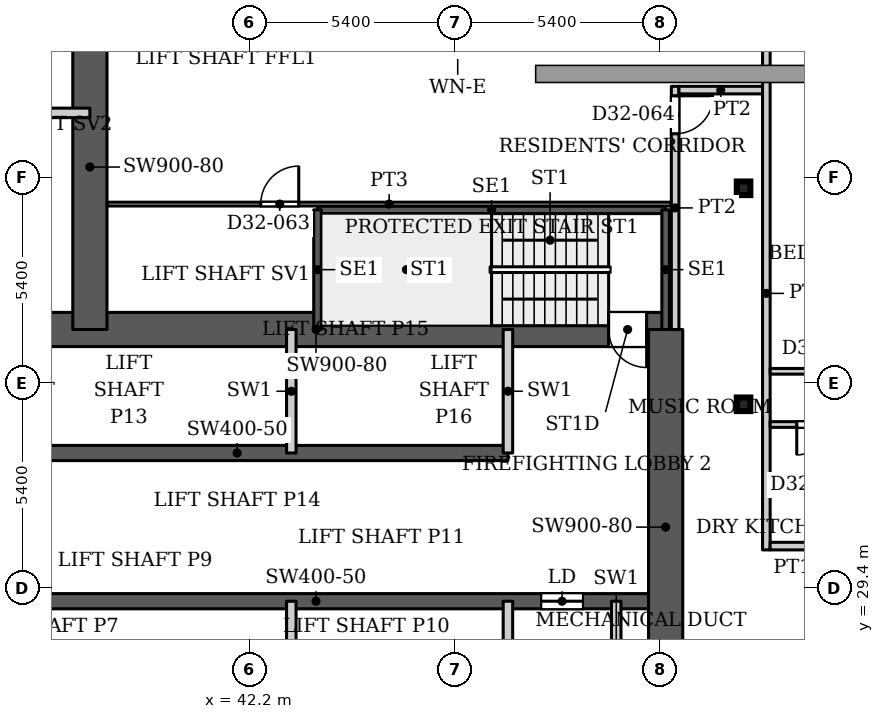
"""IFC4 building model, lengths in metres.
Left out: names, types, materials, properties, quantities, classifications, styles, units other than length and angle.
Written with IfcOpenShell. Run it as: python <this file> out.ifc"""

import sys

from ifc_helpers import new_model, si_unit, direction, frame, frame_2d, origin, origin_2d, place, context, subcontext, project, spatial, rectangle, hollow_rectangle, extrude, source, transform, mapped, element, fill, save


model = new_model("IFC4")
c1 = context("Model", 3, precision=1e-05, world=origin(), true_north=direction((0.0, 1.0)))
c2 = subcontext(c1, "Body", "Model", "MODEL_VIEW")
j1 = project(units=[si_unit("LENGTHUNIT", "METRE"), si_unit("PLANEANGLEUNIT", "RADIAN")], contexts=[c1])
p1 = place(None, origin())
s1 = spatial("IfcSite", under=j1, at=p1, CompositionType="ELEMENT")
p2 = place(p1, origin())
s2 = spatial("IfcBuilding", under=s1, at=p2, CompositionType="ELEMENT")
p3 = place(p2, frame((0.0, 0.0, 137.0)))
s3 = spatial("IfcBuildingStorey", under=s2, at=p3, CompositionType="ELEMENT", Elevation=137.0)
for number, where, z_axis, x_axis in (
    (1, (55.2, 34.232, 0.0), (0.0, 0.0, 1.0), (1.0, 0.0, 0.0)),
    (2, (55.2, 39.916, 0.0), (0.0, 0.0, 1.0), (1.0, 0.0, 0.0)),
):
    element("IfcColumn", number, at=place(p3, frame(where, z_axis=z_axis, x_axis=x_axis)), inside=s3, PredefinedType="COLUMN", context=c2, shape_type="SweptSolid", body=[
        extrude(hollow_rectangle(XDim=0.356, YDim=0.356, WallThickness=0.016, InnerFilletRadius=0.016, OuterFilletRadius=0.032, at=origin_2d()), origin(), (0.0, 0.0, 1.0), 3.9),
    ])
p4 = place(p3, frame((34.75, 29.05, 0.0), z_axis=(0.0, 0.0, 1.0), x_axis=(1.0, 0.0, 0.0)))
e3 = element("IfcWall", 3, at=p4, inside=s3, PredefinedType="SHEAR", context=c2, shape_type="SweptSolid", body=[
    extrude(rectangle(XDim=18.4, YDim=0.4, at=frame_2d((9.2, 0.0))), origin(), (0.0, 0.0, 1.0), 3.9),
])
p5 = place(p4, frame((15.125, 0.0, 0.0)))
e4 = element("IfcOpeningElement", 4, at=p5, cuts=e3, PredefinedType="OPENING", context=c2, shape_type="SweptSolid", body=[
    extrude(rectangle(XDim=1.1, YDim=2.2, at=frame_2d((0.55, 1.1))), frame((0.0, 0.21, 0.0), z_axis=(0.0, -1.0, 0.0), x_axis=(1.0, 0.0, 0.0)), (0.0, 0.0, 1.0), 0.42),
])
p6 = place(p3, frame((34.75, 32.95, 0.0), z_axis=(0.0, 0.0, 1.0), x_axis=(1.0, 0.0, 0.0)))
e5 = element("IfcWall", 5, at=p6, inside=s3, PredefinedType="SHEAR", context=c2, shape_type="SweptSolid", body=[
    extrude(rectangle(XDim=14.25, YDim=0.4, at=frame_2d((7.125, 0.0))), origin(), (0.0, 0.0, 1.0), 3.9),
])
p7 = place(p3, frame((34.75, 36.2, 0.0), z_axis=(0.0, 0.0, 1.0), x_axis=(1.0, 0.0, 0.0)))
e6 = element("IfcWall", 6, at=p7, inside=s3, PredefinedType="SHEAR", context=c2, shape_type="SweptSolid", body=[
    extrude(rectangle(XDim=18.4, YDim=0.9, at=frame_2d((9.2, 0.0))), origin(), (0.0, 0.0, 1.0), 3.9),
])
p8 = place(p7, frame((16.9, 0.0, 0.0)))
e7 = element("IfcOpeningElement", 7, at=p8, cuts=e6, PredefinedType="OPENING", context=c2, shape_type="SweptSolid", body=[
    extrude(rectangle(XDim=1.0, YDim=2.2, at=frame_2d((0.5, 1.1))), frame((0.0, 0.46, 0.0), z_axis=(0.0, -1.0, 0.0), x_axis=(1.0, 0.0, 0.0)), (0.0, 0.0, 1.0), 0.92),
])
p9 = place(p3, frame((38.0, 36.2, 0.0), z_axis=(0.0, 0.0, 1.0), x_axis=(0.0, 1.0, 0.0)))
e8 = element("IfcWall", 8, at=p9, inside=s3, PredefinedType="SHEAR", context=c2, shape_type="SweptSolid", body=[
    extrude(rectangle(XDim=8.55, YDim=0.9, at=frame_2d((4.275, 0.0))), origin(), (0.0, 0.0, 1.0), 3.9),
])
p10 = place(p3, frame((53.15, 25.8, 0.0), z_axis=(0.0, 0.0, 1.0), x_axis=(0.0, 1.0, 0.0)))
e9 = element("IfcWall", 9, at=p10, inside=s3, PredefinedType="SHEAR", context=c2, shape_type="SweptSolid", body=[
    extrude(rectangle(XDim=10.4, YDim=0.9, at=frame_2d((5.2, 0.0))), origin(), (0.0, 0.0, 1.0), 3.9),
])
p11 = place(p3, frame((43.99, 39.35, 0.0), z_axis=(0.0, 0.0, 1.0), x_axis=(1.0, 0.0, 0.0)))
e10 = element("IfcWall", 10, at=p11, inside=s3, PredefinedType="SHEAR", context=c2, shape_type="SweptSolid", body=[
    extrude(rectangle(XDim=9.16, YDim=0.2, at=frame_2d((4.58, 0.0))), origin(), (0.0, 0.0, 1.0), 3.9),
])
for number, where, z_axis, x_axis in (
    (11, (43.99, 36.2, 0.0), (0.0, 0.0, 1.0), (0.0, 1.0, 0.0)),
    (12, (53.15, 36.2, 0.0), (0.0, 0.0, 1.0), (0.0, 1.0, 0.0)),
):
    element("IfcWall", number, at=place(p3, frame(where, z_axis=z_axis, x_axis=x_axis)), inside=s3, PredefinedType="SHEAR", context=c2, shape_type="SweptSolid", body=[
        extrude(rectangle(XDim=3.15, YDim=0.2, at=frame_2d((1.575, 0.0))), origin(), (0.0, 0.0, 1.0), 3.9),
    ])
for number, where, z_axis, x_axis in (
    (13, (43.3, 25.8, 0.0), (0.0, 0.0, 1.0), (0.0, 1.0, 0.0)),
    (14, (43.3, 32.95, 0.0), (0.0, 0.0, 1.0), (0.0, 1.0, 0.0)),
    (15, (49.0, 25.8, 0.0), (0.0, 0.0, 1.0), (0.0, 1.0, 0.0)),
    (16, (49.0, 32.95, 0.0), (0.0, 0.0, 1.0), (0.0, 1.0, 0.0)),
    (17, (51.85, 25.8, 0.0), (0.0, 0.0, 1.0), (0.0, 1.0, 0.0)),
    (18, (34.75, 41.9, 0.0), (0.0, 0.0, 1.0), (1.0, 0.0, 0.0)),
):
    element("IfcWall", number, at=place(p3, frame(where, z_axis=z_axis, x_axis=x_axis)), inside=s3, PredefinedType="PARTITIONING", context=c2, shape_type="SweptSolid", body=[
        extrude(rectangle(XDim=3.25, YDim=0.25, at=frame_2d((1.625, 0.0))), origin(), (0.0, 0.0, 1.0), 3.9),
    ])
p12 = place(p3, frame((38.449, 39.5, 0.0), z_axis=(0.0, 0.0, 1.0), x_axis=(1.0, 0.0, 0.0)))
e19 = element("IfcWall", 19, at=p12, inside=s3, PredefinedType="PARTITIONING", context=c2, shape_type="SweptSolid", body=[
    extrude(rectangle(XDim=14.851, YDim=0.1, at=frame_2d((7.426, 0.0))), origin(), (0.0, 0.0, 1.0), 3.6),
])
p13 = place(p12, frame((4.047, 0.0, 0.0)))
e20 = element("IfcOpeningElement", 20, at=p13, cuts=e19, PredefinedType="OPENING", context=c2, shape_type="SweptSolid", body=[
    extrude(rectangle(XDim=1.0, YDim=2.1, at=frame_2d((0.5, 1.05))), frame((0.0, 0.06, 0.0), z_axis=(0.0, -1.0, 0.0), x_axis=(1.0, 0.0, 0.0)), (0.0, 0.0, 1.0), 0.12),
])
p14 = place(p3, frame((53.4, 36.199, 0.0), z_axis=(0.0, 0.0, 1.0), x_axis=(0.0, 1.0, 0.0)))
e21 = element("IfcWall", 21, at=p14, inside=s3, PredefinedType="PARTITIONING", context=c2, shape_type="SweptSolid", body=[
    extrude(rectangle(XDim=6.401, YDim=0.2, at=frame_2d((3.201, 0.0))), origin(), (0.0, 0.0, 1.0), 3.6),
])
p15 = place(p14, frame((5.151, 0.0, 0.0)))
e22 = element("IfcOpeningElement", 22, at=p15, cuts=e21, PredefinedType="OPENING", context=c2, shape_type="SweptSolid", body=[
    extrude(rectangle(XDim=1.0, YDim=2.1, at=frame_2d((0.5, 1.05))), frame((0.0, 0.11, 0.0), z_axis=(0.0, -1.0, 0.0), x_axis=(1.0, 0.0, 0.0)), (0.0, 0.0, 1.0), 0.22),
])
p16 = place(p3, frame((53.5, 42.5, 0.0), z_axis=(0.0, 0.0, 1.0), x_axis=(1.0, 0.0, 0.0)))
e23 = element("IfcWall", 23, at=p16, inside=s3, PredefinedType="PARTITIONING", context=c2, shape_type="SweptSolid", body=[
    extrude(rectangle(XDim=2.2, YDim=0.2, at=frame_2d((1.1, 0.0))), origin(), (0.0, 0.0, 1.0), 3.6),
])
p17 = place(p3, frame((55.8, 30.4, 0.0), z_axis=(0.0, 0.0, 1.0), x_axis=(0.0, 1.0, 0.0)))
e24 = element("IfcWall", 24, at=p17, inside=s3, PredefinedType="PARTITIONING", context=c2, shape_type="SweptSolid", body=[
    extrude(rectangle(XDim=13.5, YDim=0.2, at=frame_2d((6.75, 0.0))), origin(), (0.0, 0.0, 1.0), 3.6),
])
p18 = place(p3, frame((55.9, 30.5, 0.0), z_axis=(0.0, 0.0, 1.0), x_axis=(1.0, 0.0, 0.0)))
e25 = element("IfcWall", 25, at=p18, inside=s3, PredefinedType="PARTITIONING", context=c2, shape_type="SweptSolid", body=[
    extrude(rectangle(XDim=42.2, YDim=0.2, at=frame_2d((21.1, 0.0))), origin(), (0.0, 0.0, 1.0), 3.6),
])
p19 = place(p18, frame((16.05, 0.0, 0.0)))
e26 = element("IfcOpeningElement", 26, at=p19, cuts=e25, PredefinedType="OPENING", context=c2, shape_type="SweptSolid", body=[
    extrude(rectangle(XDim=1.0, YDim=2.1, at=frame_2d((0.5, 1.05))), frame((0.0, 0.11, 0.0), z_axis=(0.0, -1.0, 0.0), x_axis=(1.0, 0.0, 0.0)), (0.0, 0.0, 1.0), 0.22),
])
p20 = place(p18, frame((22.8, 0.0, 0.0)))
e27 = element("IfcOpeningElement", 27, at=p20, cuts=e25, PredefinedType="OPENING", context=c2, shape_type="SweptSolid", body=[
    extrude(rectangle(XDim=1.0, YDim=2.1, at=frame_2d((0.5, 1.05))), frame((0.0, 0.11, 0.0), z_axis=(0.0, -1.0, 0.0), x_axis=(1.0, 0.0, 0.0)), (0.0, 0.0, 1.0), 0.22),
])
p21 = place(p18, frame((29.55, 0.0, 0.0)))
e28 = element("IfcOpeningElement", 28, at=p21, cuts=e25, PredefinedType="OPENING", context=c2, shape_type="SweptSolid", body=[
    extrude(rectangle(XDim=1.0, YDim=2.1, at=frame_2d((0.5, 1.05))), frame((0.0, 0.11, 0.0), z_axis=(0.0, -1.0, 0.0), x_axis=(1.0, 0.0, 0.0)), (0.0, 0.0, 1.0), 0.22),
])
p22 = place(p3, frame((55.9, 33.7, 0.0), z_axis=(0.0, 0.0, 1.0), x_axis=(1.0, 0.0, 0.0)))
e29 = element("IfcWall", 29, at=p22, inside=s3, PredefinedType="PARTITIONING", context=c2, shape_type="SweptSolid", body=[
    extrude(rectangle(XDim=15.575, YDim=0.15, at=frame_2d((7.788, 0.0))), origin(), (0.0, 0.0, 1.0), 3.6),
])
p23 = place(p22, frame((3.1, 0.0, 0.0)))
e30 = element("IfcOpeningElement", 30, at=p23, cuts=e29, PredefinedType="OPENING", context=c2, shape_type="SweptSolid", body=[
    extrude(rectangle(XDim=0.8, YDim=2.1, at=frame_2d((0.4, 1.05))), frame((0.0, 0.085, 0.0), z_axis=(0.0, -1.0, 0.0), x_axis=(1.0, 0.0, 0.0)), (0.0, 0.0, 1.0), 0.17),
])
p24 = place(p22, frame((8.8, 0.0, 0.0)))
e31 = element("IfcOpeningElement", 31, at=p24, cuts=e29, PredefinedType="OPENING", context=c2, shape_type="SweptSolid", body=[
    extrude(rectangle(XDim=0.8, YDim=2.1, at=frame_2d((0.4, 1.05))), frame((0.0, 0.085, 0.0), z_axis=(0.0, -1.0, 0.0), x_axis=(1.0, 0.0, 0.0)), (0.0, 0.0, 1.0), 0.17),
])
p25 = place(p22, frame((0.7, 0.0, 0.0)))
e32 = element("IfcOpeningElement", 32, at=p25, cuts=e29, PredefinedType="OPENING", context=c2, shape_type="SweptSolid", body=[
    extrude(rectangle(XDim=0.8, YDim=2.1, at=frame_2d((0.4, 1.05))), frame((0.0, 0.085, 0.0), z_axis=(0.0, -1.0, 0.0), x_axis=(1.0, 0.0, 0.0)), (0.0, 0.0, 1.0), 0.17),
])
p26 = place(p22, frame((11.6, 0.0, 0.0)))
e33 = element("IfcOpeningElement", 33, at=p26, cuts=e29, PredefinedType="OPENING", context=c2, shape_type="SweptSolid", body=[
    extrude(rectangle(XDim=0.9, YDim=2.1, at=frame_2d((0.45, 1.05))), frame((0.0, 0.085, 0.0), z_axis=(0.0, -1.0, 0.0), x_axis=(1.0, 0.0, 0.0)), (0.0, 0.0, 1.0), 0.17),
])
p27 = place(p22, frame((6.7, 0.0, 0.0)))
e34 = element("IfcOpeningElement", 34, at=p27, cuts=e29, PredefinedType="OPENING", context=c2, shape_type="SweptSolid", body=[
    extrude(rectangle(XDim=0.8, YDim=2.1, at=frame_2d((0.4, 1.05))), frame((0.0, 0.085, 0.0), z_axis=(0.0, -1.0, 0.0), x_axis=(1.0, 0.0, 0.0)), (0.0, 0.0, 1.0), 0.17),
])
p28 = place(p22, frame((14.2, 0.0, 0.0)))
e35 = element("IfcOpeningElement", 35, at=p28, cuts=e29, PredefinedType="OPENING", context=c2, shape_type="SweptSolid", body=[
    extrude(rectangle(XDim=0.8, YDim=2.1, at=frame_2d((0.4, 1.05))), frame((0.0, 0.085, 0.0), z_axis=(0.0, -1.0, 0.0), x_axis=(1.0, 0.0, 0.0)), (0.0, 0.0, 1.0), 0.17),
])
p29 = place(p3, frame((55.9, 35.1, 0.0), z_axis=(0.0, 0.0, 1.0), x_axis=(1.0, 0.0, 0.0)))
e36 = element("IfcWall", 36, at=p29, inside=s3, PredefinedType="PARTITIONING", context=c2, shape_type="SweptSolid", body=[
    extrude(rectangle(XDim=17.5, YDim=0.15, at=frame_2d((8.75, 0.0))), origin(), (0.0, 0.0, 1.0), 3.6),
])
p30 = place(p29, frame((0.95, 0.0, 0.0)))
e37 = element("IfcOpeningElement", 37, at=p30, cuts=e36, PredefinedType="OPENING", context=c2, shape_type="SweptSolid", body=[
    extrude(rectangle(XDim=0.9, YDim=2.1, at=frame_2d((0.45, 1.05))), frame((0.0, 0.085, 0.0), z_axis=(0.0, -1.0, 0.0), x_axis=(1.0, 0.0, 0.0)), (0.0, 0.0, 1.0), 0.17),
])
p31 = place(p29, frame((15.35, 0.0, 0.0)))
e38 = element("IfcOpeningElement", 38, at=p31, cuts=e36, PredefinedType="OPENING", context=c2, shape_type="SweptSolid", body=[
    extrude(rectangle(XDim=0.9, YDim=2.1, at=frame_2d((0.45, 1.05))), frame((0.0, 0.085, 0.0), z_axis=(0.0, -1.0, 0.0), x_axis=(1.0, 0.0, 0.0)), (0.0, 0.0, 1.0), 0.17),
])
p32 = place(p29, frame((7.5, 0.0, 0.0)))
e39 = element("IfcOpeningElement", 39, at=p32, cuts=e36, PredefinedType="OPENING", context=c2, shape_type="SweptSolid", body=[
    extrude(rectangle(XDim=1.0, YDim=2.1, at=frame_2d((0.5, 1.05))), frame((0.0, 0.085, 0.0), z_axis=(0.0, -1.0, 0.0), x_axis=(1.0, 0.0, 0.0)), (0.0, 0.0, 1.0), 0.17),
])
p33 = place(p29, frame((3.6, 0.0, 0.0)))
e40 = element("IfcOpeningElement", 40, at=p33, cuts=e36, PredefinedType="OPENING", context=c2, shape_type="SweptSolid", body=[
    extrude(rectangle(XDim=1.6, YDim=2.1, at=frame_2d((0.8, 1.05))), frame((0.0, 0.085, 0.0), z_axis=(0.0, -1.0, 0.0), x_axis=(1.0, 0.0, 0.0)), (0.0, 0.0, 1.0), 0.17),
])
p34 = place(p29, frame((10.55, 0.0, 0.0)))
e41 = element("IfcOpeningElement", 41, at=p34, cuts=e36, PredefinedType="OPENING", context=c2, shape_type="SweptSolid", body=[
    extrude(rectangle(XDim=0.9, YDim=2.1, at=frame_2d((0.45, 1.05))), frame((0.0, 0.085, 0.0), z_axis=(0.0, -1.0, 0.0), x_axis=(1.0, 0.0, 0.0)), (0.0, 0.0, 1.0), 0.17),
])
m1 = source(origin(), c2, "Body", "SweptSolid", [
    extrude(rectangle(XDim=1.1, YDim=2.2, at=frame_2d((0.55, 1.1))), frame((0.0, 0.025, 0.0), z_axis=(0.0, -1.0, 0.0), x_axis=(1.0, 0.0, 0.0)), (0.0, 0.0, 1.0), 0.05),
])
p35 = place(p5, origin())
e42 = element("IfcDoor", 42, at=p35, inside=s3, OperationType="SLIDING_TO_LEFT", PredefinedType="DOOR", context=c2, shape_type="MappedRepresentation", body=[
    mapped(m1, transform((0.0, 0.0, 0.0), x_axis=(1.0, 0.0, 0.0), y_axis=(0.0, 1.0, 0.0), z_axis=(0.0, 0.0, 1.0), scale=1.0)),
])
fill(e4, e42)
m2 = source(origin(), c2, "Body", "SweptSolid", [
    extrude(rectangle(XDim=1.0, YDim=2.2, at=frame_2d((0.5, 1.1))), frame((0.0, 0.025, 0.0), z_axis=(0.0, -1.0, 0.0), x_axis=(1.0, 0.0, 0.0)), (0.0, 0.0, 1.0), 0.05),
])
p36 = place(p8, origin())
e43 = element("IfcDoor", 43, at=p36, inside=s3, OperationType="SINGLE_SWING_RIGHT", PredefinedType="DOOR", context=c2, shape_type="MappedRepresentation", body=[
    mapped(m2, transform((0.0, 0.0, 0.0), x_axis=(1.0, 0.0, 0.0), y_axis=(0.0, 1.0, 0.0), z_axis=(0.0, 0.0, 1.0), scale=1.0)),
])
fill(e7, e43)
m3 = source(origin(), c2, "Body", "SweptSolid", [
    extrude(rectangle(XDim=0.8, YDim=2.1, at=frame_2d((0.4, 1.05))), frame((0.0, 0.025, 0.0), z_axis=(0.0, -1.0, 0.0), x_axis=(1.0, 0.0, 0.0)), (0.0, 0.0, 1.0), 0.05),
])
p37 = place(p25, origin())
e44 = element("IfcDoor", 44, at=p37, inside=s3, OperationType="SINGLE_SWING_RIGHT", PredefinedType="DOOR", context=c2, shape_type="MappedRepresentation", body=[
    mapped(m3, transform((0.0, 0.0, 0.0), x_axis=(1.0, 0.0, 0.0), y_axis=(0.0, 1.0, 0.0), z_axis=(0.0, 0.0, 1.0), scale=1.0)),
])
fill(e32, e44)
m4 = source(origin(), c2, "Body", "SweptSolid", [
    extrude(rectangle(XDim=1.0, YDim=2.1, at=frame_2d((0.5, 1.05))), frame((0.0, 0.025, 0.0), z_axis=(0.0, -1.0, 0.0), x_axis=(1.0, 0.0, 0.0)), (0.0, 0.0, 1.0), 0.05),
])
p38 = place(p13, origin())
e45 = element("IfcDoor", 45, at=p38, inside=s3, OperationType="SINGLE_SWING_LEFT", PredefinedType="DOOR", context=c2, shape_type="MappedRepresentation", body=[
    mapped(m4, transform((0.0, 0.0, 0.0), x_axis=(1.0, 0.0, 0.0), y_axis=(0.0, 1.0, 0.0), z_axis=(0.0, 0.0, 1.0), scale=1.0)),
])
fill(e20, e45)
m5 = source(origin(), c2, "Body", "SweptSolid", [
    extrude(rectangle(XDim=1.0, YDim=2.1, at=frame_2d((0.5, 1.05))), frame((0.0, 0.025, 0.0), z_axis=(0.0, -1.0, 0.0), x_axis=(1.0, 0.0, 0.0)), (0.0, 0.0, 1.0), 0.05),
])
p39 = place(p15, origin())
e46 = element("IfcDoor", 46, at=p39, inside=s3, OperationType="SINGLE_SWING_RIGHT", PredefinedType="DOOR", context=c2, shape_type="MappedRepresentation", body=[
    mapped(m5, transform((0.0, 0.0, 0.0), x_axis=(1.0, 0.0, 0.0), y_axis=(0.0, 1.0, 0.0), z_axis=(0.0, 0.0, 1.0), scale=1.0)),
])
fill(e22, e46)
save(model, sys.argv[1])
